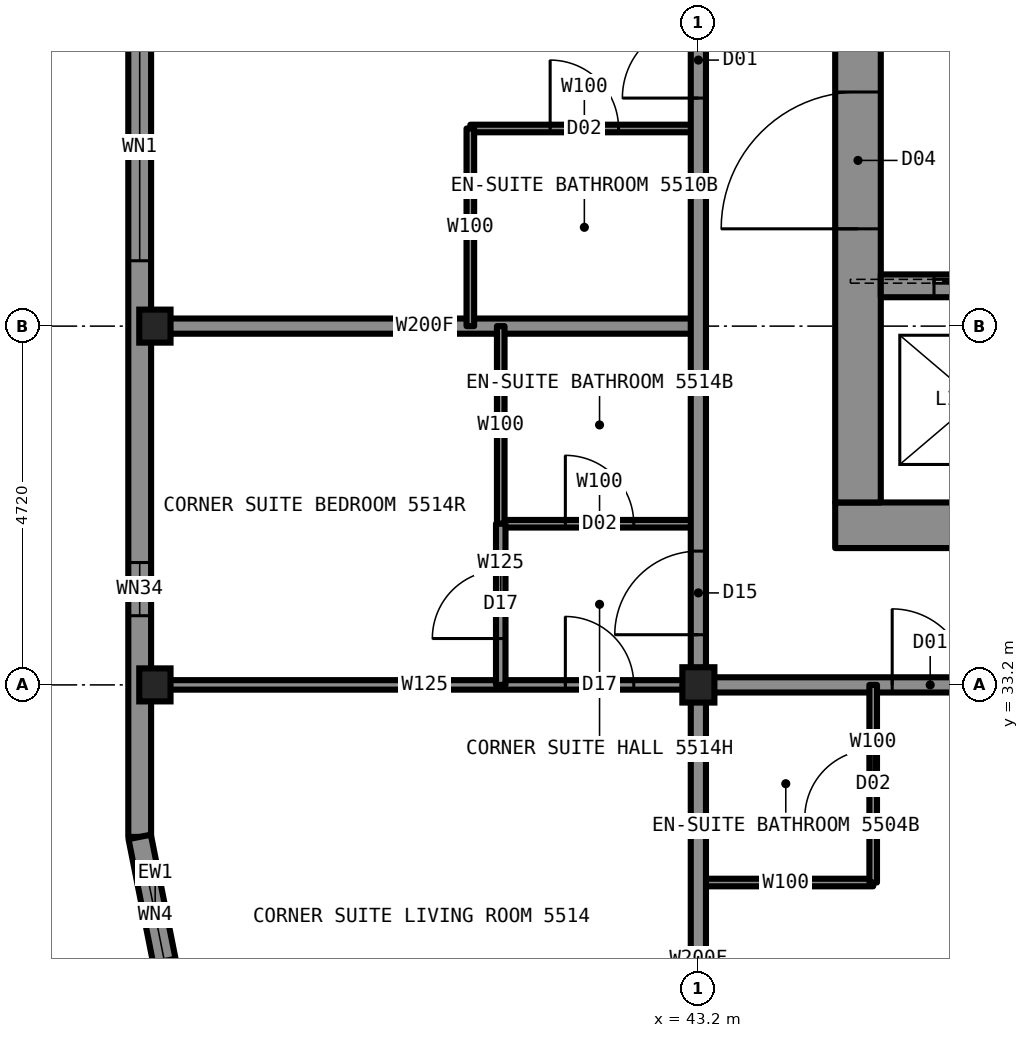
"""IFC4 building model, lengths in metres.
Left out: names, types, materials, properties, quantities, classifications, styles, units other than length and angle.
Written with IfcOpenShell. Run it as: python <this file> out.ifc"""

import sys

from ifc_helpers import new_model, si_unit, direction, frame, frame_2d, origin, origin_2d, place, context, subcontext, project, spatial, rectangle, i_section, extrude, element, fill, save


model = new_model("IFC4")
c1 = context("Model", 3, precision=1e-05, world=origin(), true_north=direction((0.0, 1.0)))
c2 = subcontext(c1, "Body", "Model", "MODEL_VIEW")
j1 = project(units=[si_unit("LENGTHUNIT", "METRE"), si_unit("PLANEANGLEUNIT", "RADIAN")], contexts=[c1])
p1 = place(None, origin())
s1 = spatial("IfcSite", under=j1, at=p1, CompositionType="ELEMENT")
p2 = place(p1, origin())
s2 = spatial("IfcBuilding", under=s1, at=p2, CompositionType="ELEMENT")
p3 = place(p2, frame((0.0, 0.0, 203.8)))
s3 = spatial("IfcBuildingStorey", under=s2, at=p3, CompositionType="ELEMENT", Elevation=203.8)
for number, where, z_axis, x_axis in (
    (1, (36.05, 33.2, 0.0), (0.0, 0.0, 1.0), (1.0, 0.0, 0.0)),
    (2, (36.05, 37.92, 0.0), (0.0, 0.0, 1.0), (1.0, 0.0, 0.0)),
):
    element("IfcColumn", number, at=place(p3, frame(where, z_axis=z_axis, x_axis=x_axis)), inside=s3, PredefinedType="COLUMN", context=c2, shape_type="SweptSolid", body=[
        extrude(i_section(OverallWidth=0.411, OverallDepth=0.434, WebThickness=0.036, FlangeThickness=0.057, at=origin_2d()), origin(), (0.0, 0.0, 1.0), 3.5),
    ])
p4 = place(p3, frame((43.2, 33.2, 0.0), z_axis=(0.0, 0.0, 1.0), x_axis=(1.0, 0.0, 0.0)))
e3 = element("IfcColumn", 3, at=p4, inside=s3, PredefinedType="COLUMN", context=c2, shape_type="SweptSolid", body=[
    extrude(i_section(OverallWidth=0.422, OverallDepth=0.465, WebThickness=0.045, FlangeThickness=0.073, at=origin_2d()), origin(), (0.0, 0.0, 1.0), 3.5),
])
p5 = place(p3, frame((45.0, 35.3, 0.0), z_axis=(0.0, 0.0, 1.0), x_axis=(1.0, 0.0, 0.0)))
e4 = element("IfcWall", 4, at=p5, inside=s3, PredefinedType="SHEAR", context=c2, shape_type="SweptSolid", body=[
    extrude(rectangle(XDim=20.0, YDim=0.6, at=frame_2d((10.0, 0.0))), origin(), (0.0, 0.0, 1.0), 3.5),
])
p6 = place(p3, frame((45.3, 35.6, 0.0), z_axis=(0.0, 0.0, 1.0), x_axis=(0.0, 1.0, 0.0)))
e5 = element("IfcWall", 5, at=p6, inside=s3, PredefinedType="SHEAR", context=c2, shape_type="SweptSolid", body=[
    extrude(rectangle(XDim=18.8, YDim=0.6, at=frame_2d((9.4, 0.0))), origin(), (0.0, 0.0, 1.0), 3.5),
])
p7 = place(p6, frame((13.4, 0.0, 0.0)))
e6 = element("IfcOpeningElement", 6, at=p7, cuts=e5, PredefinedType="OPENING", context=c2, shape_type="SweptSolid", body=[
    extrude(rectangle(XDim=1.8, YDim=2.2, at=frame_2d((0.9, 1.1))), frame((0.0, 0.31, 0.0), z_axis=(0.0, -1.0, 0.0), x_axis=(1.0, 0.0, 0.0)), (0.0, 0.0, 1.0), 0.62),
])
p8 = place(p6, frame((3.6, 0.0, 0.0)))
e7 = element("IfcOpeningElement", 7, at=p8, cuts=e5, PredefinedType="OPENING", context=c2, shape_type="SweptSolid", body=[
    extrude(rectangle(XDim=1.8, YDim=2.2, at=frame_2d((0.9, 1.1))), frame((0.0, 0.31, 0.0), z_axis=(0.0, -1.0, 0.0), x_axis=(1.0, 0.0, 0.0)), (0.0, 0.0, 1.0), 0.62),
])
p9 = place(p6, frame((6.4, 0.0, 0.0)))
e8 = element("IfcOpeningElement", 8, at=p9, cuts=e5, PredefinedType="OPENING", context=c2, shape_type="SweptSolid", body=[
    extrude(rectangle(XDim=1.2, YDim=2.2, at=frame_2d((0.6, 1.1))), frame((0.0, 0.31, 0.0), z_axis=(0.0, -1.0, 0.0), x_axis=(1.0, 0.0, 0.0)), (0.0, 0.0, 1.0), 0.62),
])
p10 = place(p3, frame((45.6, 38.45, 0.0), z_axis=(0.0, 0.0, 1.0), x_axis=(1.0, 0.0, 0.0)))
e9 = element("IfcWall", 9, at=p10, inside=s3, PredefinedType="SHEAR", context=c2, shape_type="SweptSolid", body=[
    extrude(rectangle(XDim=18.8, YDim=0.3, at=frame_2d((9.4, 0.0))), origin(), (0.0, 0.0, 1.0), 3.5),
])
p11 = place(p10, frame((0.7, 0.0, 0.0)))
e10 = element("IfcOpeningElement", 10, at=p11, cuts=e9, PredefinedType="OPENING", context=c2, shape_type="SweptSolid", body=[
    extrude(rectangle(XDim=1.1, YDim=2.2, at=frame_2d((0.55, 1.1))), frame((0.0, 0.16, 0.0), z_axis=(0.0, -1.0, 0.0), x_axis=(1.0, 0.0, 0.0)), (0.0, 0.0, 1.0), 0.32),
])
p12 = place(p10, frame((3.4, 0.0, 0.0)))
e11 = element("IfcOpeningElement", 11, at=p12, cuts=e9, PredefinedType="OPENING", context=c2, shape_type="SweptSolid", body=[
    extrude(rectangle(XDim=1.1, YDim=2.2, at=frame_2d((0.55, 1.1))), frame((0.0, 0.16, 0.0), z_axis=(0.0, -1.0, 0.0), x_axis=(1.0, 0.0, 0.0)), (0.0, 0.0, 1.0), 0.32),
])
p13 = place(p10, frame((6.1, 0.0, 0.0)))
e12 = element("IfcOpeningElement", 12, at=p13, cuts=e9, PredefinedType="OPENING", context=c2, shape_type="SweptSolid", body=[
    extrude(rectangle(XDim=1.1, YDim=2.2, at=frame_2d((0.55, 1.1))), frame((0.0, 0.16, 0.0), z_axis=(0.0, -1.0, 0.0), x_axis=(1.0, 0.0, 0.0)), (0.0, 0.0, 1.0), 0.32),
])
p14 = place(p10, frame((8.8, 0.0, 0.0)))
e13 = element("IfcOpeningElement", 13, at=p14, cuts=e9, PredefinedType="OPENING", context=c2, shape_type="SweptSolid", body=[
    extrude(rectangle(XDim=1.1, YDim=2.2, at=frame_2d((0.55, 1.1))), frame((0.0, 0.16, 0.0), z_axis=(0.0, -1.0, 0.0), x_axis=(1.0, 0.0, 0.0)), (0.0, 0.0, 1.0), 0.32),
])
p15 = place(p3, frame((43.2, 33.2, 0.0), z_axis=(0.0, 0.0, 1.0), x_axis=(1.0, 0.0, 0.0)))
e14 = element("IfcWall", 14, at=p15, inside=s3, PredefinedType="PARTITIONING", context=c2, shape_type="SweptSolid", body=[
    extrude(rectangle(XDim=23.6, YDim=0.2, at=frame_2d((11.8, 0.0))), origin(), (0.0, 0.0, 1.0), 3.33),
])
p16 = place(p15, frame((2.55, 0.0, 0.0)))
e15 = element("IfcOpeningElement", 15, at=p16, cuts=e14, PredefinedType="OPENING", context=c2, shape_type="SweptSolid", body=[
    extrude(rectangle(XDim=1.0, YDim=2.2, at=frame_2d((0.5, 1.1))), frame((0.0, 0.11, 0.0), z_axis=(0.0, -1.0, 0.0), x_axis=(1.0, 0.0, 0.0)), (0.0, 0.0, 1.0), 0.22),
])
p17 = place(p15, frame((6.57, 0.0, 0.0)))
e16 = element("IfcOpeningElement", 16, at=p17, cuts=e14, PredefinedType="OPENING", context=c2, shape_type="SweptSolid", body=[
    extrude(rectangle(XDim=1.1, YDim=2.2, at=frame_2d((0.55, 1.1))), frame((0.0, 0.11, 0.0), z_axis=(0.0, -1.0, 0.0), x_axis=(1.0, 0.0, 0.0)), (0.0, 0.0, 1.0), 0.22),
])
p18 = place(p15, frame((21.14, 0.0, 0.0)))
e17 = element("IfcOpeningElement", 17, at=p18, cuts=e14, PredefinedType="OPENING", context=c2, shape_type="SweptSolid", body=[
    extrude(rectangle(XDim=1.0, YDim=2.2, at=frame_2d((0.5, 1.1))), frame((0.0, 0.11, 0.0), z_axis=(0.0, -1.0, 0.0), x_axis=(1.0, 0.0, 0.0)), (0.0, 0.0, 1.0), 0.22),
])
p19 = place(p3, frame((36.0, 33.2, 0.0), z_axis=(0.0, 0.0, 1.0), x_axis=(1.0, 0.0, 0.0)))
e18 = element("IfcWall", 18, at=p19, inside=s3, PredefinedType="PARTITIONING", context=c2, shape_type="SweptSolid", body=[
    extrude(rectangle(XDim=7.2, YDim=0.125, at=frame_2d((3.6, 0.0))), origin(), (0.0, 0.0, 1.0), 2.573),
])
p20 = place(p19, frame((5.45, 0.0, 0.0)))
e19 = element("IfcOpeningElement", 19, at=p20, cuts=e18, PredefinedType="OPENING", context=c2, shape_type="SweptSolid", body=[
    extrude(rectangle(XDim=0.9, YDim=2.2, at=frame_2d((0.45, 1.1))), frame((0.0, 0.073, 0.0), z_axis=(0.0, -1.0, 0.0), x_axis=(1.0, 0.0, 0.0)), (0.0, 0.0, 1.0), 0.145),
])
p21 = place(p3, frame((43.2, 30.6, 0.0), z_axis=(0.0, 0.0, 1.0), x_axis=(1.0, 0.0, 0.0)))
e20 = element("IfcWall", 20, at=p21, inside=s3, PredefinedType="PARTITIONING", context=c2, shape_type="SweptSolid", body=[
    extrude(rectangle(XDim=2.3, YDim=0.1, at=frame_2d((1.15, 0.0))), origin(), (0.0, 0.0, 1.0), 3.33),
])
p22 = place(p3, frame((40.2, 40.52, 0.0), z_axis=(0.0, 0.0, 1.0), x_axis=(1.0, 0.0, 0.0)))
e21 = element("IfcWall", 21, at=p22, inside=s3, PredefinedType="PARTITIONING", context=c2, shape_type="SweptSolid", body=[
    extrude(rectangle(XDim=3.0, YDim=0.1, at=frame_2d((1.5, 0.0))), origin(), (0.0, 0.0, 1.0), 3.33),
])
p23 = place(p22, frame((1.05, 0.0, 0.0)))
e22 = element("IfcOpeningElement", 22, at=p23, cuts=e21, PredefinedType="OPENING", context=c2, shape_type="SweptSolid", body=[
    extrude(rectangle(XDim=0.9, YDim=2.1, at=frame_2d((0.45, 1.05))), frame((0.0, 0.06, 0.0), z_axis=(0.0, -1.0, 0.0), x_axis=(1.0, 0.0, 0.0)), (0.0, 0.0, 1.0), 0.12),
])
p24 = place(p3, frame((36.0, 37.92, 0.0), z_axis=(0.0, 0.0, 1.0), x_axis=(1.0, 0.0, 0.0)))
e23 = element("IfcWall", 23, at=p24, inside=s3, PredefinedType="PARTITIONING", context=c2, shape_type="SweptSolid", body=[
    extrude(rectangle(XDim=7.2, YDim=0.2, at=frame_2d((3.6, 0.0))), origin(), (0.0, 0.0, 1.0), 2.573),
])
p25 = place(p3, frame((40.6, 35.32, 0.0), z_axis=(0.0, 0.0, 1.0), x_axis=(1.0, 0.0, 0.0)))
e24 = element("IfcWall", 24, at=p25, inside=s3, PredefinedType="PARTITIONING", context=c2, shape_type="SweptSolid", body=[
    extrude(rectangle(XDim=2.6, YDim=0.1, at=frame_2d((1.3, 0.0))), origin(), (0.0, 0.0, 1.0), 3.33),
])
p26 = place(p25, frame((0.85, 0.0, 0.0)))
e25 = element("IfcOpeningElement", 25, at=p26, cuts=e24, PredefinedType="OPENING", context=c2, shape_type="SweptSolid", body=[
    extrude(rectangle(XDim=0.9, YDim=2.1, at=frame_2d((0.45, 1.05))), frame((0.0, 0.06, 0.0), z_axis=(0.0, -1.0, 0.0), x_axis=(1.0, 0.0, 0.0)), (0.0, 0.0, 1.0), 0.12),
])
p27 = place(p3, frame((43.2, 33.2, 0.0), z_axis=(0.0, 0.0, 1.0), x_axis=(0.0, 1.0, 0.0)))
e26 = element("IfcWall", 26, at=p27, inside=s3, PredefinedType="PARTITIONING", context=c2, shape_type="SweptSolid", body=[
    extrude(rectangle(XDim=23.58, YDim=0.2, at=frame_2d((11.79, 0.0))), origin(), (0.0, 0.0, 1.0), 3.33),
])
p28 = place(p27, frame((7.72, 0.0, 0.0)))
e27 = element("IfcOpeningElement", 27, at=p28, cuts=e26, PredefinedType="OPENING", context=c2, shape_type="SweptSolid", body=[
    extrude(rectangle(XDim=1.0, YDim=2.2, at=frame_2d((0.5, 1.1))), frame((0.0, 0.11, 0.0), z_axis=(0.0, -1.0, 0.0), x_axis=(1.0, 0.0, 0.0)), (0.0, 0.0, 1.0), 0.22),
])
p29 = place(p27, frame((17.31, 0.0, 0.0)))
e28 = element("IfcOpeningElement", 28, at=p29, cuts=e26, PredefinedType="OPENING", context=c2, shape_type="SweptSolid", body=[
    extrude(rectangle(XDim=1.0, YDim=2.2, at=frame_2d((0.5, 1.1))), frame((0.0, 0.11, 0.0), z_axis=(0.0, -1.0, 0.0), x_axis=(1.0, 0.0, 0.0)), (0.0, 0.0, 1.0), 0.22),
])
p30 = place(p27, frame((22.05, 0.0, 0.0)))
e29 = element("IfcOpeningElement", 29, at=p30, cuts=e26, PredefinedType="OPENING", context=c2, shape_type="SweptSolid", body=[
    extrude(rectangle(XDim=1.1, YDim=2.2, at=frame_2d((0.55, 1.1))), frame((0.0, 0.11, 0.0), z_axis=(0.0, -1.0, 0.0), x_axis=(1.0, 0.0, 0.0)), (0.0, 0.0, 1.0), 0.22),
])
p31 = place(p27, frame((0.66, 0.0, 0.0)))
e30 = element("IfcOpeningElement", 30, at=p31, cuts=e26, PredefinedType="OPENING", context=c2, shape_type="SweptSolid", body=[
    extrude(rectangle(XDim=1.1, YDim=2.2, at=frame_2d((0.55, 1.1))), frame((0.0, 0.11, 0.0), z_axis=(0.0, -1.0, 0.0), x_axis=(1.0, 0.0, 0.0)), (0.0, 0.0, 1.0), 0.22),
])
p32 = place(p3, frame((43.2, 26.0, 0.0), z_axis=(0.0, 0.0, 1.0), x_axis=(0.0, 1.0, 0.0)))
e31 = element("IfcWall", 31, at=p32, inside=s3, PredefinedType="PARTITIONING", context=c2, shape_type="SweptSolid", body=[
    extrude(rectangle(XDim=7.2, YDim=0.2, at=frame_2d((3.6, 0.0))), origin(), (0.0, 0.0, 1.0), 2.573),
])
p33 = place(p3, frame((40.6, 35.32, 0.0), z_axis=(0.0, 0.0, 1.0), x_axis=(0.0, 1.0, 0.0)))
e32 = element("IfcWall", 32, at=p33, inside=s3, PredefinedType="PARTITIONING", context=c2, shape_type="SweptSolid", body=[
    extrude(rectangle(XDim=2.6, YDim=0.1, at=frame_2d((1.3, 0.0))), origin(), (0.0, 0.0, 1.0), 3.33),
])
p34 = place(p3, frame((40.6, 33.2, 0.0), z_axis=(0.0, 0.0, 1.0), x_axis=(0.0, 1.0, 0.0)))
e33 = element("IfcWall", 33, at=p34, inside=s3, PredefinedType="PARTITIONING", context=c2, shape_type="SweptSolid", body=[
    extrude(rectangle(XDim=2.12, YDim=0.125, at=frame_2d((1.06, 0.0))), origin(), (0.0, 0.0, 1.0), 3.33),
])
p35 = place(p34, frame((0.61, 0.0, 0.0)))
e34 = element("IfcOpeningElement", 34, at=p35, cuts=e33, PredefinedType="OPENING", context=c2, shape_type="SweptSolid", body=[
    extrude(rectangle(XDim=0.9, YDim=2.2, at=frame_2d((0.45, 1.1))), frame((0.0, 0.073, 0.0), z_axis=(0.0, -1.0, 0.0), x_axis=(1.0, 0.0, 0.0)), (0.0, 0.0, 1.0), 0.145),
])
p36 = place(p3, frame((40.2, 37.92, 0.0), z_axis=(0.0, 0.0, 1.0), x_axis=(0.0, 1.0, 0.0)))
e35 = element("IfcWall", 35, at=p36, inside=s3, PredefinedType="PARTITIONING", context=c2, shape_type="SweptSolid", body=[
    extrude(rectangle(XDim=2.6, YDim=0.1, at=frame_2d((1.3, 0.0))), origin(), (0.0, 0.0, 1.0), 3.33),
])
p37 = place(p3, frame((45.5, 30.6, 0.0), z_axis=(0.0, 0.0, 1.0), x_axis=(0.0, 1.0, 0.0)))
e36 = element("IfcWall", 36, at=p37, inside=s3, PredefinedType="PARTITIONING", context=c2, shape_type="SweptSolid", body=[
    extrude(rectangle(XDim=2.6, YDim=0.1, at=frame_2d((1.3, 0.0))), origin(), (0.0, 0.0, 1.0), 3.33),
])
p38 = place(p37, frame((0.85, 0.0, 0.0)))
e37 = element("IfcOpeningElement", 37, at=p38, cuts=e36, PredefinedType="OPENING", context=c2, shape_type="SweptSolid", body=[
    extrude(rectangle(XDim=0.9, YDim=2.1, at=frame_2d((0.45, 1.05))), frame((0.0, 0.06, 0.0), z_axis=(0.0, -1.0, 0.0), x_axis=(1.0, 0.0, 0.0)), (0.0, 0.0, 1.0), 0.12),
])
p39 = place(p3, frame((35.85, 58.8, 0.0), z_axis=(0.0, 0.0, 1.0), x_axis=(0.0, -1.0, 0.0)))
e38 = element("IfcWall", 38, at=p39, inside=s3, PredefinedType="SOLIDWALL", context=c2, shape_type="SweptSolid", body=[
    extrude(rectangle(XDim=27.6, YDim=0.3, at=frame_2d((13.8, 0.0))), origin(), (0.0, 0.0, 1.0), 2.83),
])
p40 = place(p39, frame((2.86, 0.0, 0.3)))
e39 = element("IfcOpeningElement", 39, at=p40, cuts=e38, PredefinedType="OPENING", context=c2, shape_type="SweptSolid", body=[
    extrude(rectangle(XDim=0.7, YDim=1.2, at=frame_2d((0.35, 0.6))), frame((0.0, 0.16, 0.0), z_axis=(0.0, -1.0, 0.0), x_axis=(1.0, 0.0, 0.0)), (0.0, 0.0, 1.0), 0.32),
])
p41 = place(p39, frame((7.58, 0.0, 0.3)))
e40 = element("IfcOpeningElement", 40, at=p41, cuts=e38, PredefinedType="OPENING", context=c2, shape_type="SweptSolid", body=[
    extrude(rectangle(XDim=3.0, YDim=2.0, at=frame_2d((1.5, 1.0))), frame((0.0, 0.16, 0.0), z_axis=(0.0, -1.0, 0.0), x_axis=(1.0, 0.0, 0.0)), (0.0, 0.0, 1.0), 0.32),
])
p42 = place(p39, frame((12.3, 0.0, 0.3)))
e41 = element("IfcOpeningElement", 41, at=p42, cuts=e38, PredefinedType="OPENING", context=c2, shape_type="SweptSolid", body=[
    extrude(rectangle(XDim=3.0, YDim=2.0, at=frame_2d((1.5, 1.0))), frame((0.0, 0.16, 0.0), z_axis=(0.0, -1.0, 0.0), x_axis=(1.0, 0.0, 0.0)), (0.0, 0.0, 1.0), 0.32),
])
p43 = place(p39, frame((17.02, 0.0, 0.3)))
e42 = element("IfcOpeningElement", 42, at=p43, cuts=e38, PredefinedType="OPENING", context=c2, shape_type="SweptSolid", body=[
    extrude(rectangle(XDim=3.0, YDim=2.0, at=frame_2d((1.5, 1.0))), frame((0.0, 0.16, 0.0), z_axis=(0.0, -1.0, 0.0), x_axis=(1.0, 0.0, 0.0)), (0.0, 0.0, 1.0), 0.32),
])
p44 = place(p39, frame((23.99, 0.0, 0.3)))
e43 = element("IfcOpeningElement", 43, at=p44, cuts=e38, PredefinedType="OPENING", context=c2, shape_type="SweptSolid", body=[
    extrude(rectangle(XDim=0.7, YDim=1.2, at=frame_2d((0.35, 0.6))), frame((0.0, 0.16, 0.0), z_axis=(0.0, -1.0, 0.0), x_axis=(1.0, 0.0, 0.0)), (0.0, 0.0, 1.0), 0.32),
])
p45 = place(p3, frame((35.85, 31.2, 0.0), z_axis=(0.0, 0.0, 1.0), x_axis=(0.195081421501, -0.980787050784, 0.0)))
e44 = element("IfcWall", 44, at=p45, inside=s3, PredefinedType="SOLIDWALL", context=c2, shape_type="SweptSolid", body=[
    extrude(rectangle(XDim=2.087, YDim=0.3, at=frame_2d((1.044, 0.0))), origin(), (0.0, 0.0, 1.0), 3.33),
])
p46 = place(p45, frame((0.444, 0.0, 0.3)))
e45 = element("IfcOpeningElement", 45, at=p46, cuts=e44, PredefinedType="OPENING", context=c2, shape_type="SweptSolid", body=[
    extrude(rectangle(XDim=1.2, YDim=2.0, at=frame_2d((0.6, 1.0))), frame((0.0, 0.16, 0.0), z_axis=(0.0, -1.0, 0.0), x_axis=(1.0, 0.0, 0.0)), (0.0, 0.0, 1.0), 0.32),
])
p47 = place(p16, origin())
e46 = element("IfcDoor", 46, at=p47, inside=s3, OperationType="SINGLE_SWING_LEFT", PredefinedType="DOOR", context=c2, shape_type="SweptSolid", body=[
    extrude(rectangle(XDim=1.0, YDim=2.2, at=frame_2d((0.5, 1.1))), frame((0.0, 0.025, 0.0), z_axis=(0.0, -1.0, 0.0), x_axis=(1.0, 0.0, 0.0)), (0.0, 0.0, 1.0), 0.05),
])
fill(e15, e46)
p48 = place(p38, origin())
e47 = element("IfcDoor", 47, at=p48, inside=s3, OperationType="SINGLE_SWING_RIGHT", PredefinedType="DOOR", context=c2, shape_type="SweptSolid", body=[
    extrude(rectangle(XDim=0.9, YDim=2.1, at=frame_2d((0.45, 1.05))), frame((0.0, 0.025, 0.0), z_axis=(0.0, -1.0, 0.0), x_axis=(1.0, 0.0, 0.0)), (0.0, 0.0, 1.0), 0.05),
])
fill(e37, e47)
p49 = place(p28, origin())
e48 = element("IfcDoor", 48, at=p49, inside=s3, OperationType="SINGLE_SWING_LEFT", PredefinedType="DOOR", context=c2, shape_type="SweptSolid", body=[
    extrude(rectangle(XDim=1.0, YDim=2.2, at=frame_2d((0.5, 1.1))), frame((0.0, 0.025, 0.0), z_axis=(0.0, -1.0, 0.0), x_axis=(1.0, 0.0, 0.0)), (0.0, 0.0, 1.0), 0.05),
])
fill(e27, e48)
p50 = place(p23, origin())
e49 = element("IfcDoor", 49, at=p50, inside=s3, OperationType="SINGLE_SWING_RIGHT", PredefinedType="DOOR", context=c2, shape_type="SweptSolid", body=[
    extrude(rectangle(XDim=0.9, YDim=2.1, at=frame_2d((0.45, 1.05))), frame((0.0, 0.025, 0.0), z_axis=(0.0, -1.0, 0.0), x_axis=(1.0, 0.0, 0.0)), (0.0, 0.0, 1.0), 0.05),
])
fill(e22, e49)
p51 = place(p20, origin())
e50 = element("IfcDoor", 50, at=p51, inside=s3, OperationType="SINGLE_SWING_LEFT", PredefinedType="DOOR", context=c2, shape_type="SweptSolid", body=[
    extrude(rectangle(XDim=0.9, YDim=2.2, at=frame_2d((0.45, 1.1))), frame((0.0, 0.025, 0.0), z_axis=(0.0, -1.0, 0.0), x_axis=(1.0, 0.0, 0.0)), (0.0, 0.0, 1.0), 0.05),
])
fill(e19, e50)
p52 = place(p26, origin())
e51 = element("IfcDoor", 51, at=p52, inside=s3, OperationType="SINGLE_SWING_RIGHT", PredefinedType="DOOR", context=c2, shape_type="SweptSolid", body=[
    extrude(rectangle(XDim=0.9, YDim=2.1, at=frame_2d((0.45, 1.05))), frame((0.0, 0.025, 0.0), z_axis=(0.0, -1.0, 0.0), x_axis=(1.0, 0.0, 0.0)), (0.0, 0.0, 1.0), 0.05),
])
fill(e25, e51)
p53 = place(p31, origin())
e52 = element("IfcDoor", 52, at=p53, inside=s3, OperationType="SINGLE_SWING_LEFT", PredefinedType="DOOR", context=c2, shape_type="SweptSolid", body=[
    extrude(rectangle(XDim=1.1, YDim=2.2, at=frame_2d((0.55, 1.1))), frame((0.0, 0.025, 0.0), z_axis=(0.0, -1.0, 0.0), x_axis=(1.0, 0.0, 0.0)), (0.0, 0.0, 1.0), 0.05),
])
fill(e30, e52)
p54 = place(p35, origin())
e53 = element("IfcDoor", 53, at=p54, inside=s3, OperationType="SINGLE_SWING_LEFT", PredefinedType="DOOR", context=c2, shape_type="SweptSolid", body=[
    extrude(rectangle(XDim=0.9, YDim=2.2, at=frame_2d((0.45, 1.1))), frame((0.0, 0.025, 0.0), z_axis=(0.0, -1.0, 0.0), x_axis=(1.0, 0.0, 0.0)), (0.0, 0.0, 1.0), 0.05),
])
fill(e34, e53)
p55 = place(p43, origin())
e54 = element("IfcWindow", 54, at=p55, inside=s3, PartitioningType="SINGLE_PANEL", PredefinedType="WINDOW", context=c2, shape_type="SweptSolid", body=[
    extrude(rectangle(XDim=3.0, YDim=2.0, at=frame_2d((1.5, 1.0))), frame((0.0, 0.13, 0.0), z_axis=(0.0, -1.0, 0.0), x_axis=(1.0, 0.0, 0.0)), (0.0, 0.0, 1.0), 0.06),
])
fill(e42, e54)
p56 = place(p44, origin())
e55 = element("IfcWindow", 55, at=p56, inside=s3, PartitioningType="SINGLE_PANEL", PredefinedType="WINDOW", context=c2, shape_type="SweptSolid", body=[
    extrude(rectangle(XDim=0.7, YDim=1.2, at=frame_2d((0.35, 0.6))), frame((0.0, 0.13, 0.0), z_axis=(0.0, -1.0, 0.0), x_axis=(1.0, 0.0, 0.0)), (0.0, 0.0, 1.0), 0.06),
])
fill(e43, e55)
p57 = place(p46, origin())
e56 = element("IfcWindow", 56, at=p57, inside=s3, PartitioningType="SINGLE_PANEL", PredefinedType="WINDOW", context=c2, shape_type="SweptSolid", body=[
    extrude(rectangle(XDim=1.2, YDim=2.0, at=frame_2d((0.6, 1.0))), frame((0.0, 0.13, 0.0), z_axis=(0.0, -1.0, 0.0), x_axis=(1.0, 0.0, 0.0)), (0.0, 0.0, 1.0), 0.06),
])
fill(e45, e56)
p58 = place(p8, origin())
e57 = element("IfcDoor", 57, at=p58, inside=s3, OperationType="DOUBLE_DOOR_SINGLE_SWING", PredefinedType="DOOR", context=c2, shape_type="SweptSolid", body=[
    extrude(rectangle(XDim=1.8, YDim=2.2, at=frame_2d((0.9, 1.1))), frame((0.0, 0.025, 0.0), z_axis=(0.0, -1.0, 0.0), x_axis=(1.0, 0.0, 0.0)), (0.0, 0.0, 1.0), 0.05),
])
fill(e7, e57)
p59 = place(p11, origin())
e58 = element("IfcDoor", 58, at=p59, inside=s3, OperationType="SLIDING_TO_LEFT", PredefinedType="DOOR", context=c2, shape_type="SweptSolid", body=[
    extrude(rectangle(XDim=1.1, YDim=2.2, at=frame_2d((0.55, 1.1))), frame((0.0, 0.025, 0.0), z_axis=(0.0, -1.0, 0.0), x_axis=(1.0, 0.0, 0.0)), (0.0, 0.0, 1.0), 0.05),
])
fill(e10, e58)
save(model, sys.argv[1])
